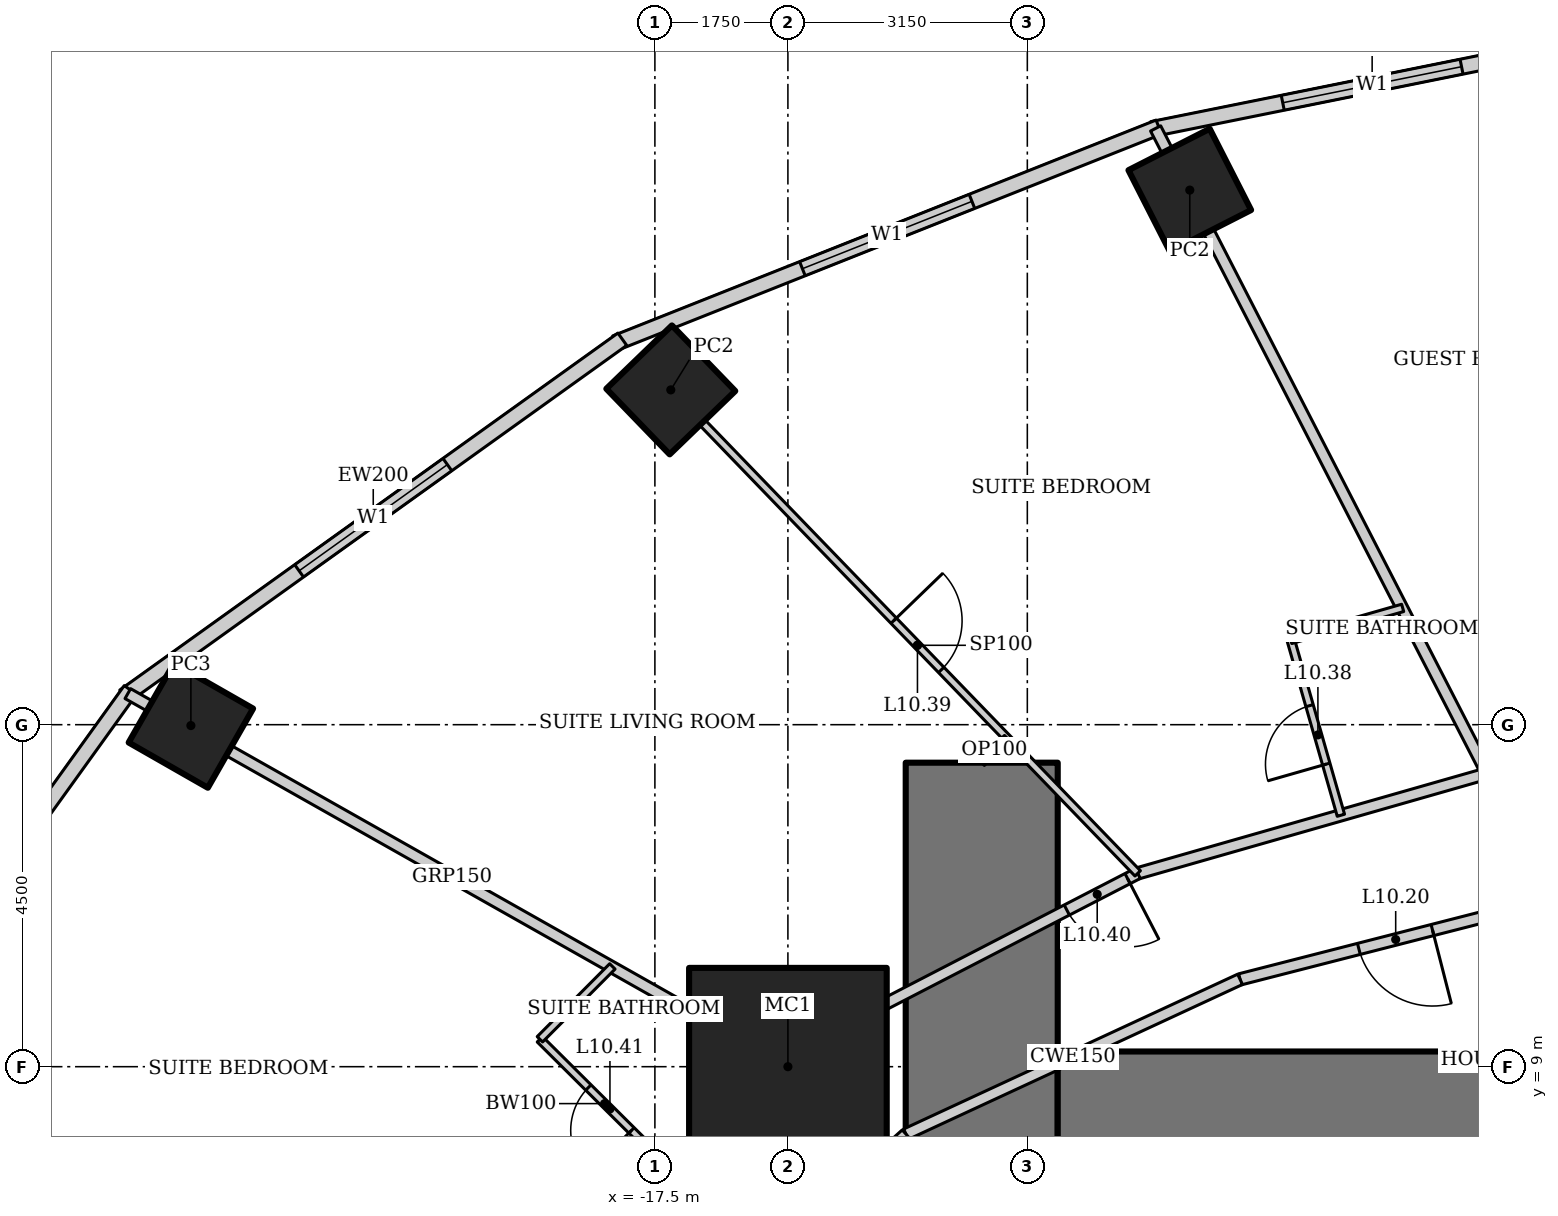
"""IFC4 building model, lengths in metres.
Left out: names, types, materials, properties, quantities, classifications, styles, units other than length and angle.
Written with IfcOpenShell. Run it as: python <this file> out.ifc"""

import sys

from ifc_helpers import new_model, si_unit, direction, frame, frame_2d, origin, origin_2d, place, context, subcontext, project, spatial, rectangle, hollow_rectangle, extrude, element, fill, save


model = new_model("IFC4")
c1 = context("Model", 3, precision=1e-05, world=origin(), true_north=direction((0.0, 1.0)))
c2 = subcontext(c1, "Body", "Model", "MODEL_VIEW")
j1 = project(units=[si_unit("LENGTHUNIT", "METRE"), si_unit("PLANEANGLEUNIT", "RADIAN")], contexts=[c1])
p1 = place(None, origin())
s1 = spatial("IfcSite", under=j1, at=p1, CompositionType="ELEMENT")
p2 = place(p1, origin())
s2 = spatial("IfcBuilding", under=s1, at=p2, CompositionType="ELEMENT")
p3 = place(p2, frame((0.0, 0.0, 51.4)))
s3 = spatial("IfcBuildingStorey", under=s2, at=p3, CompositionType="ELEMENT", Elevation=51.4)
p4 = place(p3, frame((-15.75, 9.0, 0.0), z_axis=(0.0, 0.0, 1.0), x_axis=(1.0, 0.0, 0.0)))
e1 = element("IfcColumn", 1, at=p4, inside=s3, PredefinedType="COLUMN", context=c2, shape_type="SweptSolid", body=[
    extrude(hollow_rectangle(XDim=2.6, YDim=2.6, WallThickness=0.13, at=origin_2d()), origin(), (0.0, 0.0, 1.0), 3.6),
])
for number, where, z_axis, x_axis in (
    (2, (-10.463, 20.534, 0.0), (0.0, 0.0, 1.0), (0.891, 0.454, 0.0)),
    (3, (-17.291, 17.905, 0.0), (0.0, 0.0, 1.0), (0.719, 0.695, 0.0)),
):
    element("IfcColumn", number, at=place(p3, frame(where, z_axis=z_axis, x_axis=x_axis)), inside=s3, PredefinedType="COLUMN", context=c2, shape_type="SweptSolid", body=[
        extrude(hollow_rectangle(XDim=1.2, YDim=1.2, WallThickness=0.1, at=origin_2d()), origin(), (0.0, 0.0, 1.0), 3.6),
    ])
p5 = place(p3, frame((-23.605, 13.489, 0.0), z_axis=(0.0, 0.0, 1.0), x_axis=(0.496139221777, 0.86824298017, 0.0)))
e4 = element("IfcColumn", 4, at=p5, inside=s3, PredefinedType="COLUMN", context=c2, shape_type="SweptSolid", body=[
    extrude(hollow_rectangle(XDim=1.2, YDim=1.2, WallThickness=0.12, at=origin_2d()), origin(), (0.0, 0.0, 1.0), 3.6),
])
p6 = place(p3, frame((-13.2, 13.0, 0.0), z_axis=(0.0, 0.0, 1.0), x_axis=(0.0, -1.0, 0.0)))
e5 = element("IfcWall", 5, at=p6, inside=s3, PredefinedType="SHEAR", context=c2, shape_type="SweptSolid", body=[
    extrude(rectangle(XDim=26.0, YDim=2.0, at=frame_2d((13.0, 0.0))), origin(), (0.0, 0.0, 1.0), 3.6),
])
p7 = place(p6, frame((12.1, 0.0, 0.0)))
e6 = element("IfcOpeningElement", 6, at=p7, cuts=e5, PredefinedType="OPENING", context=c2, shape_type="SweptSolid", body=[
    extrude(rectangle(XDim=1.8, YDim=2.1, at=frame_2d((0.9, 1.05))), frame((0.0, 1.01, 0.0), z_axis=(0.0, -1.0, 0.0), x_axis=(1.0, 0.0, 0.0)), (0.0, 0.0, 1.0), 2.02),
])
p8 = place(p3, frame((12.2, 8.0, 0.0), z_axis=(0.0, 0.0, 1.0), x_axis=(-1.0, 0.0, 0.0)))
e7 = element("IfcWall", 7, at=p8, inside=s3, PredefinedType="SHEAR", context=c2, shape_type="SweptSolid", body=[
    extrude(rectangle(XDim=24.4, YDim=2.4, at=frame_2d((12.2, 0.0))), origin(), (0.0, 0.0, 1.0), 3.6),
])
p9 = place(p3, frame((-5.17, 22.504, 0.0), z_axis=(0.0, 0.0, 1.0), x_axis=(-0.980251657452, -0.197754110105, 0.0)))
e8 = element("IfcWall", 8, at=p9, inside=s3, PredefinedType="SOLIDWALL", context=c2, shape_type="SweptSolid", body=[
    extrude(rectangle(XDim=5.904, YDim=0.2, at=frame_2d((2.952, 0.0))), origin(), (0.0, 0.0, 1.0), 3.45),
])
p10 = place(p9, frame((1.752, 0.0, 0.5)))
e9 = element("IfcOpeningElement", 9, at=p10, cuts=e8, PredefinedType="OPENING", context=c2, shape_type="SweptSolid", body=[
    extrude(rectangle(XDim=2.4, YDim=2.2, at=frame_2d((1.2, 1.1))), frame((0.0, 0.11, 0.0), z_axis=(0.0, -1.0, 0.0), x_axis=(1.0, 0.0, 0.0)), (0.0, 0.0, 1.0), 0.22),
])
p11 = place(p3, frame((-10.869, 21.363, 0.0), z_axis=(0.0, 0.0, 1.0), x_axis=(-0.929358351251, -0.369178892895, 0.0)))
e10 = element("IfcWall", 10, at=p11, inside=s3, PredefinedType="SOLIDWALL", context=c2, shape_type="SweptSolid", body=[
    extrude(rectangle(XDim=7.692, YDim=0.2, at=frame_2d((3.846, 0.0))), origin(), (0.0, 0.0, 1.0), 3.45),
])
p12 = place(p11, frame((2.646, 0.0, 0.5)))
e11 = element("IfcOpeningElement", 11, at=p12, cuts=e10, PredefinedType="OPENING", context=c2, shape_type="SweptSolid", body=[
    extrude(rectangle(XDim=2.4, YDim=2.2, at=frame_2d((1.2, 1.1))), frame((0.0, 0.11, 0.0), z_axis=(0.0, -1.0, 0.0), x_axis=(1.0, 0.0, 0.0)), (0.0, 0.0, 1.0), 0.22),
])
p13 = place(p3, frame((-17.929, 18.572, 0.0), z_axis=(0.0, 0.0, 1.0), x_axis=(-0.812791321576, -0.582554948112, 0.0)))
e12 = element("IfcWall", 12, at=p13, inside=s3, PredefinedType="SOLIDWALL", context=c2, shape_type="SweptSolid", body=[
    extrude(rectangle(XDim=8.063, YDim=0.2, at=frame_2d((4.032, 0.0))), origin(), (0.0, 0.0, 1.0), 3.45),
])
p14 = place(p13, frame((2.832, 0.0, 0.5)))
e13 = element("IfcOpeningElement", 13, at=p14, cuts=e12, PredefinedType="OPENING", context=c2, shape_type="SweptSolid", body=[
    extrude(rectangle(XDim=2.4, YDim=2.2, at=frame_2d((1.2, 1.1))), frame((0.0, 0.11, 0.0), z_axis=(0.0, -1.0, 0.0), x_axis=(1.0, 0.0, 0.0)), (0.0, 0.0, 1.0), 0.22),
])
p15 = place(p3, frame((-24.4, 13.957, 0.0), z_axis=(0.0, 0.0, 1.0), x_axis=(-0.583937613703, -0.811798536155, 0.0)))
e14 = element("IfcWall", 14, at=p15, inside=s3, PredefinedType="SOLIDWALL", context=c2, shape_type="SweptSolid", body=[
    extrude(rectangle(XDim=8.323, YDim=0.2, at=frame_2d((4.162, 0.0))), origin(), (0.0, 0.0, 1.0), 3.45),
])
p16 = place(p15, frame((2.961, 0.0, 0.5)))
e15 = element("IfcOpeningElement", 15, at=p16, cuts=e14, PredefinedType="OPENING", context=c2, shape_type="SweptSolid", body=[
    extrude(rectangle(XDim=2.4, YDim=2.2, at=frame_2d((1.2, 1.1))), frame((0.0, 0.11, 0.0), z_axis=(0.0, -1.0, 0.0), x_axis=(1.0, 0.0, 0.0)), (0.0, 0.0, 1.0), 0.22),
])
p17 = place(p3, frame((-10.912, 21.346, 0.0), z_axis=(0.0, 0.0, 1.0), x_axis=(0.456950233066, -0.889492262193, 0.0)))
e16 = element("IfcWall", 16, at=p17, inside=s3, PredefinedType="PARTITIONING", context=c2, shape_type="SweptSolid", body=[
    extrude(rectangle(XDim=9.542, YDim=0.15, at=frame_2d((4.771, 0.0))), origin(), (0.0, 0.0, 1.0), 2.528),
])
p18 = place(p3, frame((-24.435, 13.909, 0.0), z_axis=(0.0, 0.0, 1.0), x_axis=(0.870612006791, -0.491970256856, 0.0)))
e17 = element("IfcWall", 17, at=p18, inside=s3, PredefinedType="PARTITIONING", context=c2, shape_type="SweptSolid", body=[
    extrude(rectangle(XDim=9.802, YDim=0.15, at=frame_2d((4.901, 0.0))), origin(), (0.0, 0.0, 1.0), 2.693),
])
p19 = place(p3, frame((-6.552, 12.858, 0.0), z_axis=(0.0, 0.0, 1.0), x_axis=(-0.961464178199, -0.27493023486, 0.0)))
e18 = element("IfcWall", 18, at=p19, inside=s3, PredefinedType="PARTITIONING", context=c2, shape_type="SweptSolid", body=[
    extrude(rectangle(XDim=4.78, YDim=0.15, at=frame_2d((2.39, 0.0))), origin(), (0.0, 0.0, 1.0), 3.45),
])
p20 = place(p3, frame((-11.147, 11.544, 0.0), z_axis=(0.0, 0.0, 1.0), x_axis=(-0.888333171507, -0.459199495209, 0.0)))
e19 = element("IfcWall", 19, at=p20, inside=s3, PredefinedType="PARTITIONING", context=c2, shape_type="SweptSolid", body=[
    extrude(rectangle(XDim=5.351, YDim=0.15, at=frame_2d((2.676, 0.0))), origin(), (0.0, 0.0, 1.0), 3.45),
])
p21 = place(p20, frame((0.15, 0.0, 0.0)))
e20 = element("IfcOpeningElement", 20, at=p21, cuts=e19, PredefinedType="OPENING", context=c2, shape_type="SweptSolid", body=[
    extrude(rectangle(XDim=0.9, YDim=2.1, at=frame_2d((0.45, 1.05))), frame((0.0, 0.085, 0.0), z_axis=(0.0, -1.0, 0.0), x_axis=(1.0, 0.0, 0.0)), (0.0, 0.0, 1.0), 0.17),
])
p22 = place(p3, frame((-15.901, 9.086, 0.0), z_axis=(0.0, 0.0, 1.0), x_axis=(-0.705121546414, -0.709086457904, 0.0)))
e21 = element("IfcWall", 21, at=p22, inside=s3, PredefinedType="PARTITIONING", context=c2, shape_type="SweptSolid", body=[
    extrude(rectangle(XDim=5.788, YDim=0.15, at=frame_2d((2.894, 0.0))), origin(), (0.0, 0.0, 1.0), 3.45),
])
p23 = place(p3, frame((-5.706, 11.198, 0.0), z_axis=(0.0, 0.0, 1.0), x_axis=(-0.968705891355, -0.248211393886, 0.0)))
e22 = element("IfcWall", 22, at=p23, inside=s3, PredefinedType="PARTITIONING", context=c2, shape_type="SweptSolid", body=[
    extrude(rectangle(XDim=4.228, YDim=0.15, at=frame_2d((2.114, 0.0))), origin(), (0.0, 0.0, 1.0), 3.45),
])
p24 = place(p23, frame((1.614, 0.0, 0.0)))
e23 = element("IfcOpeningElement", 23, at=p24, cuts=e22, PredefinedType="OPENING", context=c2, shape_type="SweptSolid", body=[
    extrude(rectangle(XDim=1.0, YDim=2.1, at=frame_2d((0.5, 1.05))), frame((0.0, 0.085, 0.0), z_axis=(0.0, -1.0, 0.0), x_axis=(1.0, 0.0, 0.0)), (0.0, 0.0, 1.0), 0.17),
])
p25 = place(p3, frame((-9.801, 10.149, 0.0), z_axis=(0.0, 0.0, 1.0), x_axis=(-0.907279653965, -0.420527798727, 0.0)))
e24 = element("IfcWall", 24, at=p25, inside=s3, PredefinedType="PARTITIONING", context=c2, shape_type="SweptSolid", body=[
    extrude(rectangle(XDim=4.844, YDim=0.15, at=frame_2d((2.422, 0.0))), origin(), (0.0, 0.0, 1.0), 3.45),
])
p26 = place(p3, frame((-14.196, 8.112, 0.0), z_axis=(0.0, 0.0, 1.0), x_axis=(-0.742194222, -0.670184852731, 0.0)))
e25 = element("IfcWall", 25, at=p26, inside=s3, PredefinedType="PARTITIONING", context=c2, shape_type="SweptSolid", body=[
    extrude(rectangle(XDim=5.347, YDim=0.15, at=frame_2d((2.673, 0.0))), origin(), (0.0, 0.0, 1.0), 3.45),
])
p27 = place(p26, frame((2.173, 0.0, 0.0)))
e26 = element("IfcOpeningElement", 26, at=p27, cuts=e25, PredefinedType="OPENING", context=c2, shape_type="SweptSolid", body=[
    extrude(rectangle(XDim=1.0, YDim=2.1, at=frame_2d((0.5, 1.05))), frame((0.0, 0.085, 0.0), z_axis=(0.0, -1.0, 0.0), x_axis=(1.0, 0.0, 0.0)), (0.0, 0.0, 1.0), 0.17),
])
p28 = place(p3, frame((-8.474, 12.308, 0.0), z_axis=(0.0, 0.0, 1.0), x_axis=(-0.27497640313, 0.961450975205, 0.0)))
e27 = element("IfcWall", 27, at=p28, inside=s3, PredefinedType="PARTITIONING", context=c2, shape_type="SweptSolid", body=[
    extrude(rectangle(XDim=2.4, YDim=0.1, at=frame_2d((1.2, 0.0))), origin(), (0.0, 0.0, 1.0), 3.45),
])
p29 = place(p28, frame((0.7, 0.0, 0.0)))
e28 = element("IfcOpeningElement", 28, at=p29, cuts=e27, PredefinedType="OPENING", context=c2, shape_type="SweptSolid", body=[
    extrude(rectangle(XDim=0.8, YDim=2.1, at=frame_2d((0.4, 1.05))), frame((0.0, 0.06, 0.0), z_axis=(0.0, -1.0, 0.0), x_axis=(1.0, 0.0, 0.0)), (0.0, 0.0, 1.0), 0.12),
])
p30 = place(p3, frame((-9.134, 14.615, 0.0), z_axis=(0.0, 0.0, 1.0), x_axis=(0.96145775668, 0.274952690695, 0.0)))
e29 = element("IfcWall", 29, at=p30, inside=s3, PredefinedType="PARTITIONING", context=c2, shape_type="SweptSolid", body=[
    extrude(rectangle(XDim=1.532, YDim=0.1, at=frame_2d((0.766, 0.0))), origin(), (0.0, 0.0, 1.0), 3.45),
])
p31 = place(p3, frame((-16.944, 17.545, 0.0), z_axis=(0.0, 0.0, 1.0), x_axis=(0.694680670522, -0.71931826475, 0.0)))
e30 = element("IfcWall", 30, at=p31, inside=s3, PredefinedType="PARTITIONING", context=c2, shape_type="SweptSolid", body=[
    extrude(rectangle(XDim=8.344, YDim=0.1, at=frame_2d((4.172, 0.0))), origin(), (0.0, 0.0, 1.0), 2.528),
])
p32 = place(p31, frame((3.722, 0.0, 0.0)))
e31 = element("IfcOpeningElement", 31, at=p32, cuts=e30, PredefinedType="OPENING", context=c2, shape_type="SweptSolid", body=[
    extrude(rectangle(XDim=0.9, YDim=2.1, at=frame_2d((0.45, 1.05))), frame((0.0, 0.06, 0.0), z_axis=(0.0, -1.0, 0.0), x_axis=(1.0, 0.0, 0.0)), (0.0, 0.0, 1.0), 0.12),
])
p33 = place(p3, frame((-17.311, 7.668, 0.0), z_axis=(0.0, 0.0, 1.0), x_axis=(-0.709138392716, 0.705069315724, 0.0)))
e32 = element("IfcWall", 32, at=p33, inside=s3, PredefinedType="PARTITIONING", context=c2, shape_type="SweptSolid", body=[
    extrude(rectangle(XDim=2.4, YDim=0.1, at=frame_2d((1.2, 0.0))), origin(), (0.0, 0.0, 1.0), 3.45),
])
p34 = place(p33, frame((0.7, 0.0, 0.0)))
e33 = element("IfcOpeningElement", 33, at=p34, cuts=e32, PredefinedType="OPENING", context=c2, shape_type="SweptSolid", body=[
    extrude(rectangle(XDim=0.8, YDim=2.1, at=frame_2d((0.4, 1.05))), frame((0.0, 0.06, 0.0), z_axis=(0.0, -1.0, 0.0), x_axis=(1.0, 0.0, 0.0)), (0.0, 0.0, 1.0), 0.12),
])
p35 = place(p3, frame((-19.013, 9.36, 0.0), z_axis=(0.0, 0.0, 1.0), x_axis=(0.7051187611, 0.709089227633, 0.0)))
e34 = element("IfcWall", 34, at=p35, inside=s3, PredefinedType="PARTITIONING", context=c2, shape_type="SweptSolid", body=[
    extrude(rectangle(XDim=1.353, YDim=0.1, at=frame_2d((0.676, 0.0))), origin(), (0.0, 0.0, 1.0), 3.45),
])
p36 = place(p3, frame((-13.2, 13.0, 0.0), z_axis=(0.0, 0.0, 1.0), x_axis=(0.719347134512, 0.69465077562, 0.0)))
e35 = element("IfcWall", 35, at=p36, inside=s3, PredefinedType="PARTITIONING", context=c2, shape_type="SweptSolid", body=[
    extrude(rectangle(XDim=0.465, YDim=0.1, at=frame_2d((0.232, 0.0))), origin(), (0.0, 0.0, 1.0), 3.45),
])
p37 = place(p10, origin())
e36 = element("IfcWindow", 36, at=p37, inside=s3, PartitioningType="SINGLE_PANEL", PredefinedType="WINDOW", context=c2, shape_type="SweptSolid", body=[
    extrude(rectangle(XDim=2.4, YDim=2.2, at=frame_2d((1.2, 1.1))), frame((0.0, 0.03, 0.0), z_axis=(0.0, -1.0, 0.0), x_axis=(1.0, 0.0, 0.0)), (0.0, 0.0, 1.0), 0.06),
])
fill(e9, e36)
p38 = place(p12, origin())
e37 = element("IfcWindow", 37, at=p38, inside=s3, PartitioningType="SINGLE_PANEL", PredefinedType="WINDOW", context=c2, shape_type="SweptSolid", body=[
    extrude(rectangle(XDim=2.4, YDim=2.2, at=frame_2d((1.2, 1.1))), frame((0.0, 0.03, 0.0), z_axis=(0.0, -1.0, 0.0), x_axis=(1.0, 0.0, 0.0)), (0.0, 0.0, 1.0), 0.06),
])
fill(e11, e37)
p39 = place(p14, origin())
e38 = element("IfcWindow", 38, at=p39, inside=s3, PartitioningType="SINGLE_PANEL", PredefinedType="WINDOW", context=c2, shape_type="SweptSolid", body=[
    extrude(rectangle(XDim=2.4, YDim=2.2, at=frame_2d((1.2, 1.1))), frame((0.0, 0.03, 0.0), z_axis=(0.0, -1.0, 0.0), x_axis=(1.0, 0.0, 0.0)), (0.0, 0.0, 1.0), 0.06),
])
fill(e13, e38)
p40 = place(p24, origin())
e39 = element("IfcDoor", 39, at=p40, inside=s3, OperationType="SINGLE_SWING_LEFT", PredefinedType="DOOR", context=c2, shape_type="SweptSolid", body=[
    extrude(rectangle(XDim=1.0, YDim=2.1, at=frame_2d((0.5, 1.05))), frame((0.0, 0.025, 0.0), z_axis=(0.0, -1.0, 0.0), x_axis=(1.0, 0.0, 0.0)), (0.0, 0.0, 1.0), 0.05),
])
fill(e23, e39)
p41 = place(p29, origin())
e40 = element("IfcDoor", 40, at=p41, inside=s3, OperationType="SINGLE_SWING_LEFT", PredefinedType="DOOR", context=c2, shape_type="SweptSolid", body=[
    extrude(rectangle(XDim=0.8, YDim=2.1, at=frame_2d((0.4, 1.05))), frame((0.0, 0.025, 0.0), z_axis=(0.0, -1.0, 0.0), x_axis=(1.0, 0.0, 0.0)), (0.0, 0.0, 1.0), 0.05),
])
fill(e28, e40)
p42 = place(p32, origin())
e41 = element("IfcDoor", 41, at=p42, inside=s3, OperationType="SINGLE_SWING_LEFT", PredefinedType="DOOR", context=c2, shape_type="SweptSolid", body=[
    extrude(rectangle(XDim=0.9, YDim=2.1, at=frame_2d((0.45, 1.05))), frame((0.0, 0.025, 0.0), z_axis=(0.0, -1.0, 0.0), x_axis=(1.0, 0.0, 0.0)), (0.0, 0.0, 1.0), 0.05),
])
fill(e31, e41)
p43 = place(p21, origin())
e42 = element("IfcDoor", 42, at=p43, inside=s3, OperationType="SINGLE_SWING_LEFT", PredefinedType="DOOR", context=c2, shape_type="SweptSolid", body=[
    extrude(rectangle(XDim=0.9, YDim=2.1, at=frame_2d((0.45, 1.05))), frame((0.0, 0.025, 0.0), z_axis=(0.0, -1.0, 0.0), x_axis=(1.0, 0.0, 0.0)), (0.0, 0.0, 1.0), 0.05),
])
fill(e20, e42)
p44 = place(p34, origin())
e43 = element("IfcDoor", 43, at=p44, inside=s3, OperationType="SINGLE_SWING_LEFT", PredefinedType="DOOR", context=c2, shape_type="SweptSolid", body=[
    extrude(rectangle(XDim=0.8, YDim=2.1, at=frame_2d((0.4, 1.05))), frame((0.0, 0.025, 0.0), z_axis=(0.0, -1.0, 0.0), x_axis=(1.0, 0.0, 0.0)), (0.0, 0.0, 1.0), 0.05),
])
fill(e33, e43)
save(model, sys.argv[1])
